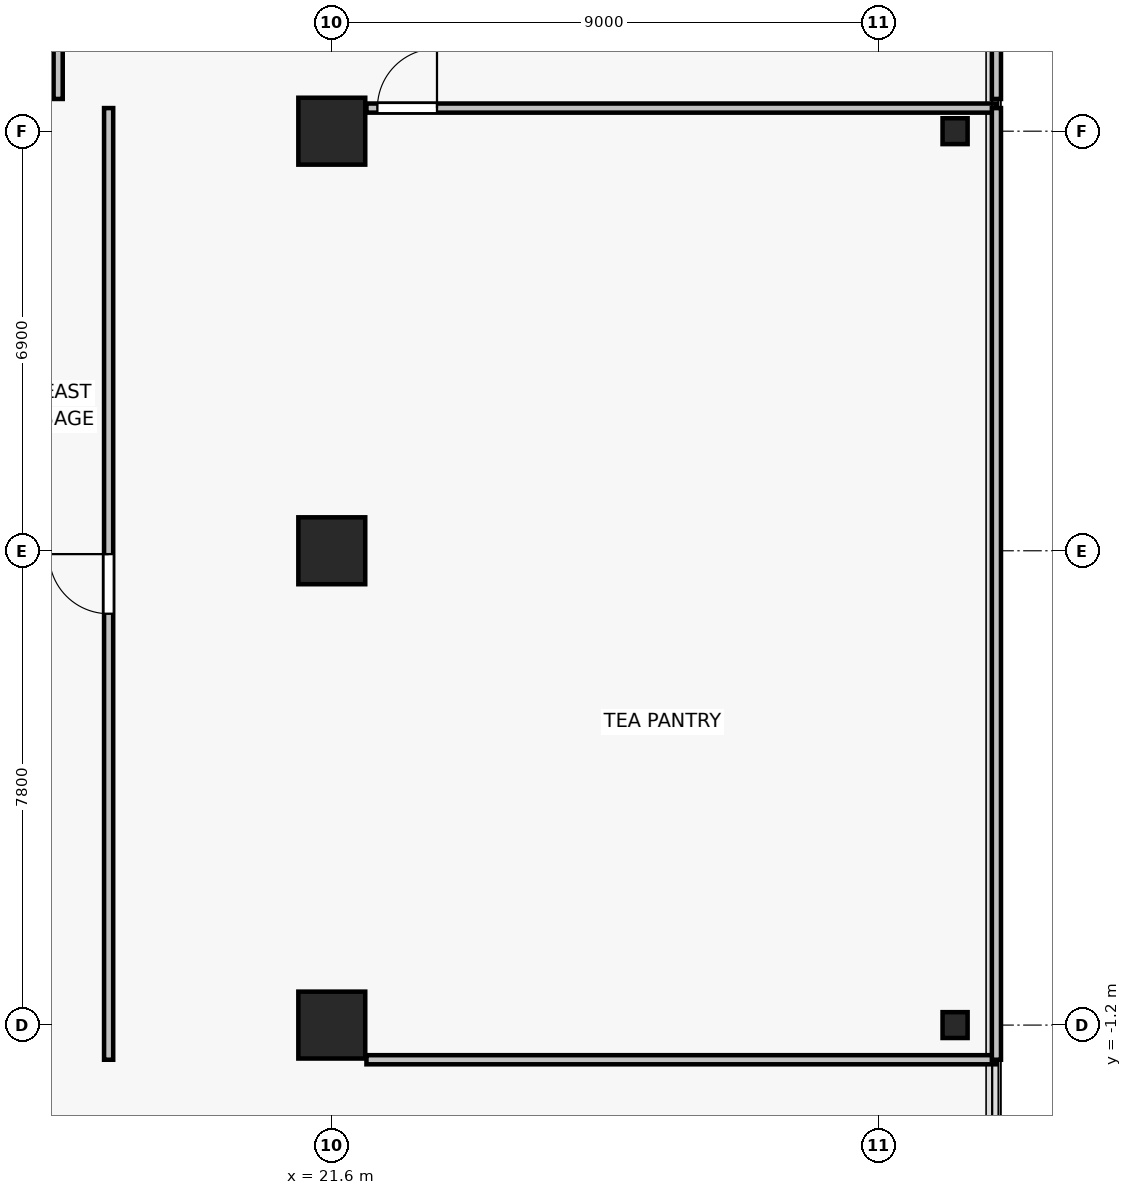
"""IFC4 building model, lengths in metres.
Left out: names, types, materials, properties, quantities, classifications, styles, units other than length and angle.
Written with IfcOpenShell. Run it as: python <this file> out.ifc"""

import sys

from ifc_helpers import new_model, si_unit, direction, frame, frame_2d, origin, origin_2d, place, context, subcontext, project, spatial, rectangle, i_section, extrude, source, transform, mapped, element, fill, save


model = new_model("IFC4")
c1 = context("Model", 3, precision=1e-05, world=origin(), true_north=direction((0.0, 1.0)))
c2 = subcontext(c1, "Body", "Model", "MODEL_VIEW")
j1 = project(units=[si_unit("LENGTHUNIT", "METRE"), si_unit("PLANEANGLEUNIT", "RADIAN")], contexts=[c1])
p1 = place(None, origin())
s1 = spatial("IfcSite", under=j1, at=p1, CompositionType="ELEMENT")
p2 = place(p1, origin())
s2 = spatial("IfcBuilding", under=s1, at=p2, CompositionType="ELEMENT")
p3 = place(p2, frame((0.0, 0.0, 60.4)))
s3 = spatial("IfcBuildingStorey", under=s2, at=p3, CompositionType="ELEMENT", Elevation=60.4)
for number, where, z_axis, x_axis in (
    (1, (21.6, -1.2, 0.0), (0.0, 0.0, 1.0), (1.0, 0.0, 0.0)),
    (2, (21.6, 6.6, 0.0), (0.0, 0.0, 1.0), (1.0, 0.0, 0.0)),
    (3, (21.6, 13.5, 0.0), (0.0, 0.0, 1.0), (1.0, 0.0, 0.0)),
):
    element("IfcColumn", number, at=place(p3, frame(where, z_axis=z_axis, x_axis=x_axis)), inside=s3, PredefinedType="COLUMN", context=c2, shape_type="SweptSolid", body=[
        extrude(rectangle(XDim=1.1, YDim=1.1, at=origin_2d()), origin(), (0.0, 0.0, 1.0), 3.3),
    ])
for number, where, z_axis, x_axis in (
    (4, (31.85, -1.2, 0.0), (0.0, 0.0, 1.0), (1.0, 0.0, 0.0)),
    (5, (31.85, 13.5, 0.0), (0.0, 0.0, 1.0), (1.0, 0.0, 0.0)),
):
    element("IfcColumn", number, at=place(p3, frame(where, z_axis=z_axis, x_axis=x_axis)), inside=s3, PredefinedType="COLUMN", context=c2, shape_type="SweptSolid", body=[
        extrude(i_section(OverallWidth=0.412, OverallDepth=0.425, WebThickness=0.026, FlangeThickness=0.039, FilletRadius=0.015, at=origin_2d()), origin(), (0.0, 0.0, 1.0), 3.3),
    ])
p4 = place(p3, frame((32.53, -1.77, 0.0), z_axis=(0.0, 0.0, 1.0), x_axis=(-1.0, 0.0, 0.0)))
e6 = element("IfcWall", 6, at=p4, inside=s3, PredefinedType="PARTITIONING", context=c2, shape_type="SweptSolid", body=[
    extrude(rectangle(XDim=10.36, YDim=0.15, at=frame_2d((5.18, 0.0))), origin(), (0.0, 0.0, 1.0), 2.465),
])
p5 = place(p3, frame((22.17, 13.88, 0.0), z_axis=(0.0, 0.0, 1.0), x_axis=(1.0, 0.0, 0.0)))
e7 = element("IfcWall", 7, at=p5, inside=s3, PredefinedType="PARTITIONING", context=c2, shape_type="SweptSolid", body=[
    extrude(rectangle(XDim=10.36, YDim=0.15, at=frame_2d((5.18, 0.0))), origin(), (0.0, 0.0, 1.0), 3.075),
])
p6 = place(p5, frame((0.18, 0.0, 0.0)))
e8 = element("IfcOpeningElement", 8, at=p6, cuts=e7, PredefinedType="OPENING", context=c2, shape_type="SweptSolid", body=[
    extrude(rectangle(XDim=0.98, YDim=2.15, at=frame_2d((0.49, 1.075))), frame((0.0, 0.085, 0.0), z_axis=(0.0, -1.0, 0.0), x_axis=(1.0, 0.0, 0.0)), (0.0, 0.0, 1.0), 0.17),
])
p7 = place(p3, frame((17.93, -1.77, 0.0), z_axis=(0.0, 0.0, 1.0), x_axis=(0.0, 1.0, 0.0)))
e9 = element("IfcWall", 9, at=p7, inside=s3, PredefinedType="PARTITIONING", context=c2, shape_type="SweptSolid", body=[
    extrude(rectangle(XDim=15.65, YDim=0.15, at=frame_2d((7.825, 0.0))), origin(), (0.0, 0.0, 1.0), 2.465),
])
p8 = place(p7, frame((7.335, 0.0, 0.0)))
e10 = element("IfcOpeningElement", 10, at=p8, cuts=e9, PredefinedType="OPENING", context=c2, shape_type="SweptSolid", body=[
    extrude(rectangle(XDim=0.98, YDim=2.15, at=frame_2d((0.49, 1.075))), frame((0.0, 0.085, 0.0), z_axis=(0.0, -1.0, 0.0), x_axis=(1.0, 0.0, 0.0)), (0.0, 0.0, 1.0), 0.17),
])
p9 = place(p3, frame((32.53, 13.88, 0.0), z_axis=(0.0, 0.0, 1.0), x_axis=(0.0, -1.0, 0.0)))
e11 = element("IfcWall", 11, at=p9, inside=s3, PredefinedType="PARTITIONING", context=c2, shape_type="SweptSolid", body=[
    extrude(rectangle(XDim=15.65, YDim=0.15, at=frame_2d((7.825, 0.0))), origin(), (0.0, 0.0, 1.0), 3.075),
])
p10 = place(p3, frame((17.1, 18.13, 0.0), z_axis=(0.0, 0.0, 1.0), x_axis=(0.0, -1.0, 0.0)))
e12 = element("IfcWall", 12, at=p10, inside=s3, PredefinedType="PARTITIONING", context=c2, shape_type="SweptSolid", body=[
    extrude(rectangle(XDim=4.1, YDim=0.15, at=frame_2d((2.05, 0.0))), origin(), (0.0, 0.0, 1.0), 2.465),
])
p11 = place(p3, frame((32.53, 18.13, 0.0), z_axis=(0.0, 0.0, 1.0), x_axis=(0.0, -1.0, 0.0)))
e13 = element("IfcWall", 13, at=p11, inside=s3, PredefinedType="PARTITIONING", context=c2, shape_type="SweptSolid", body=[
    extrude(rectangle(XDim=4.1, YDim=0.15, at=frame_2d((2.05, 0.0))), origin(), (0.0, 0.0, 1.0), 3.075),
])
m1 = source(origin(), c2, "Body", "SweptSolid", [
    extrude(rectangle(XDim=0.98, YDim=2.15, at=frame_2d((0.49, 1.075))), frame((0.0, 0.025, 0.0), z_axis=(0.0, -1.0, 0.0), x_axis=(1.0, 0.0, 0.0)), (0.0, 0.0, 1.0), 0.05),
])
p12 = place(p8, origin())
e14 = element("IfcDoor", 14, at=p12, inside=s3, OperationType="SINGLE_SWING_RIGHT", PredefinedType="DOOR", context=c2, shape_type="MappedRepresentation", body=[
    mapped(m1, transform((0.0, 0.0, 0.0), x_axis=(1.0, 0.0, 0.0), y_axis=(0.0, 1.0, 0.0), z_axis=(0.0, 0.0, 1.0), scale=1.0)),
])
fill(e10, e14)
p13 = place(p6, origin())
e15 = element("IfcDoor", 15, at=p13, inside=s3, OperationType="SINGLE_SWING_RIGHT", PredefinedType="DOOR", context=c2, shape_type="MappedRepresentation", body=[
    mapped(m1, transform((0.0, 0.0, 0.0), x_axis=(1.0, 0.0, 0.0), y_axis=(0.0, 1.0, 0.0), z_axis=(0.0, 0.0, 1.0), scale=1.0)),
])
fill(e8, e15)
save(model, sys.argv[1])
